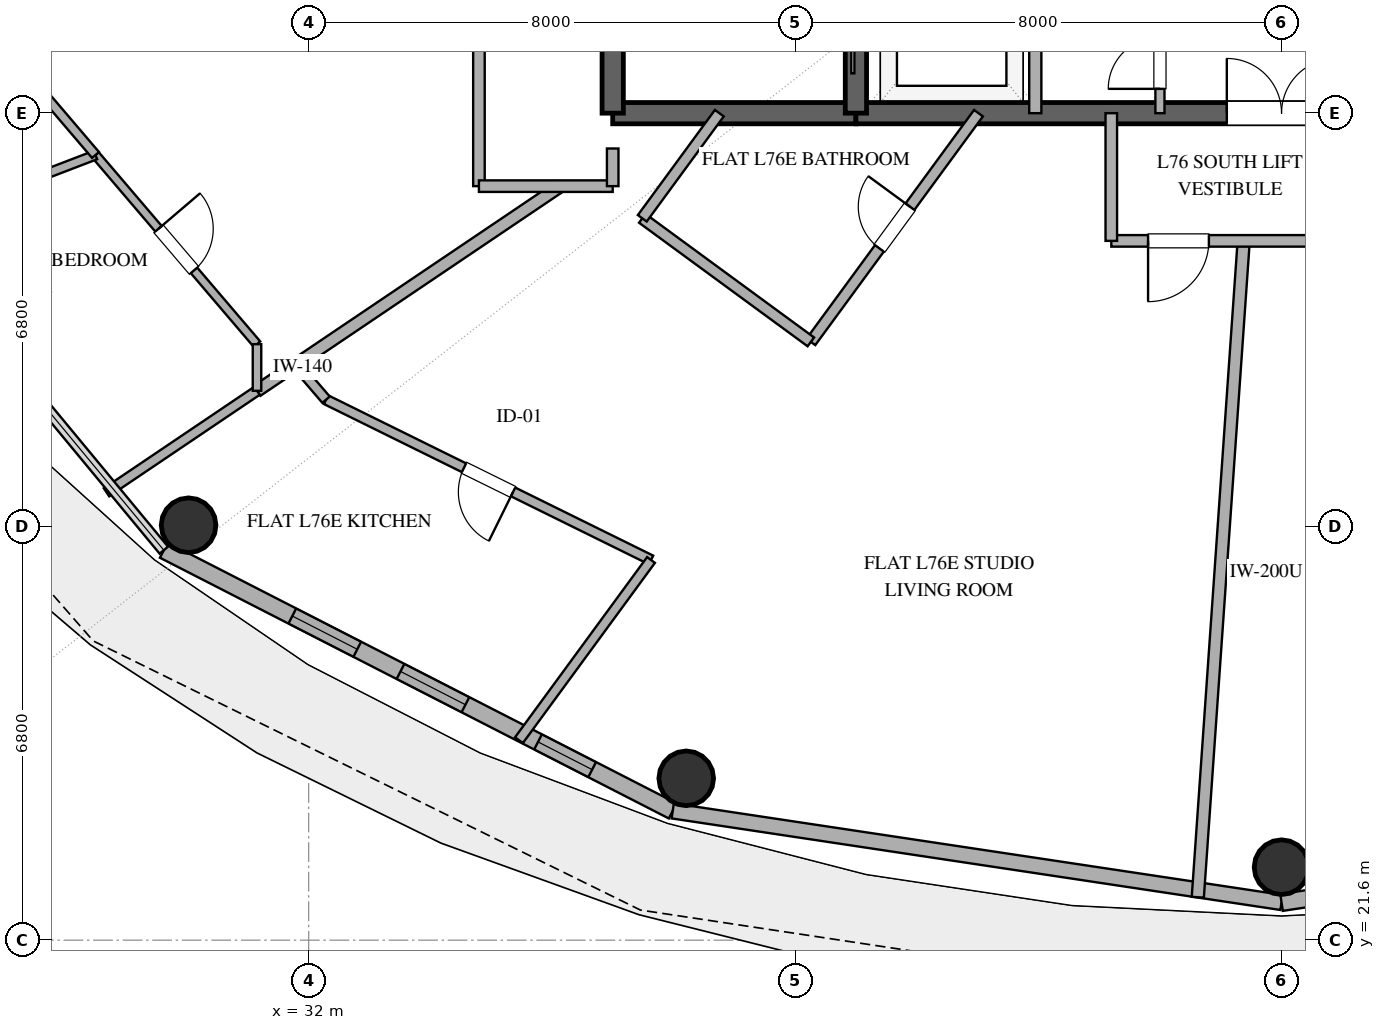
"""IFC4 building model, lengths in metres.
Left out: names, types, materials, properties, quantities, classifications, styles, units other than length and angle.
Written with IfcOpenShell. Run it as: python <this file> out.ifc"""

import sys

from ifc_helpers import new_model, si_unit, direction, frame, frame_2d, origin, origin_2d, place, context, subcontext, project, spatial, rectangle, hollow_circle, extrude, element, fill, save


model = new_model("IFC4")
c1 = context("Model", 3, precision=1e-05, world=origin(), true_north=direction((0.0, 1.0)))
c2 = subcontext(c1, "Body", "Model", "MODEL_VIEW")
j1 = project(units=[si_unit("LENGTHUNIT", "METRE"), si_unit("PLANEANGLEUNIT", "RADIAN")], contexts=[c1])
p1 = place(None, origin())
s1 = spatial("IfcSite", under=j1, at=p1, CompositionType="ELEMENT")
p2 = place(p1, origin())
s2 = spatial("IfcBuilding", under=s1, at=p2, CompositionType="ELEMENT")
p3 = place(p2, frame((0.0, 0.0, 294.6)))
s3 = spatial("IfcBuildingStorey", under=s2, at=p3, CompositionType="ELEMENT", Elevation=294.6)
p4 = place(p3, frame((37.0, 35.2, 0.0), z_axis=(0.0, 0.0, 1.0), x_axis=(1.0, 0.0, 0.0)))
e1 = element("IfcWall", 1, at=p4, inside=s3, PredefinedType="SHEAR", context=c2, shape_type="SweptSolid", body=[
    extrude(rectangle(XDim=4.0, YDim=0.35, at=frame_2d((2.0, 0.0))), origin(), (0.0, 0.0, 1.0), 3.37),
])
p5 = place(p3, frame((41.0, 35.2, 0.0), z_axis=(0.0, 0.0, 1.0), x_axis=(1.0, 0.0, 0.0)))
e2 = element("IfcWall", 2, at=p5, inside=s3, PredefinedType="SHEAR", context=c2, shape_type="SweptSolid", body=[
    extrude(rectangle(XDim=14.0, YDim=0.35, at=frame_2d((7.0, 0.0))), origin(), (0.0, 0.0, 1.0), 3.37),
])
p6 = place(p5, frame((6.1, 0.0, 0.0)))
e3 = element("IfcOpeningElement", 3, at=p6, cuts=e2, PredefinedType="OPENING", context=c2, shape_type="SweptSolid", body=[
    extrude(rectangle(XDim=1.8, YDim=2.25, at=frame_2d((0.9, 1.125))), frame((0.0, 0.185, 0.0), z_axis=(0.0, -1.0, 0.0), x_axis=(1.0, 0.0, 0.0)), (0.0, 0.0, 1.0), 0.37),
])
p7 = place(p3, frame((37.0, 35.2, 0.0), z_axis=(0.0, 0.0, 1.0), x_axis=(0.0, 1.0, 0.0)))
e4 = element("IfcWall", 4, at=p7, inside=s3, PredefinedType="SHEAR", context=c2, shape_type="SweptSolid", body=[
    extrude(rectangle(XDim=13.6, YDim=0.35, at=frame_2d((6.8, 0.0))), origin(), (0.0, 0.0, 1.0), 3.37),
])
p8 = place(p7, frame((1.5, 0.0, 0.0)))
e5 = element("IfcOpeningElement", 5, at=p8, cuts=e4, PredefinedType="OPENING", context=c2, shape_type="SweptSolid", body=[
    extrude(rectangle(XDim=1.2, YDim=2.15, at=frame_2d((0.6, 1.075))), frame((0.0, 0.185, 0.0), z_axis=(0.0, -1.0, 0.0), x_axis=(1.0, 0.0, 0.0)), (0.0, 0.0, 1.0), 0.37),
])
p9 = place(p3, frame((41.0, 35.2, 0.0), z_axis=(0.0, 0.0, 1.0), x_axis=(0.0, 1.0, 0.0)))
e6 = element("IfcWall", 6, at=p9, inside=s3, PredefinedType="SHEAR", context=c2, shape_type="SweptSolid", body=[
    extrude(rectangle(XDim=13.6, YDim=0.35, at=frame_2d((6.8, 0.0))), origin(), (0.0, 0.0, 1.0), 3.37),
])
p10 = place(p9, frame((1.15, 0.0, 0.0)))
e7 = element("IfcOpeningElement", 7, at=p10, cuts=e6, PredefinedType="OPENING", context=c2, shape_type="SweptSolid", body=[
    extrude(rectangle(XDim=1.1, YDim=2.2, at=frame_2d((0.55, 1.1))), frame((0.0, 0.185, 0.0), z_axis=(0.0, -1.0, 0.0), x_axis=(1.0, 0.0, 0.0)), (0.0, 0.0, 1.0), 0.37),
])
for number, where, z_axis, x_axis in (
    (8, (30.025, 28.424, 0.0), (0.0, 0.0, 1.0), (1.0, 0.0, 0.0)),
    (9, (38.209, 24.261, 0.0), (0.0, 0.0, 1.0), (1.0, 0.0, 0.0)),
    (10, (48.0, 22.8, 0.0), (0.0, 0.0, 1.0), (1.0, 0.0, 0.0)),
):
    element("IfcColumn", number, at=place(p3, frame(where, z_axis=z_axis, x_axis=x_axis)), inside=s3, PredefinedType="COLUMN", context=c2, shape_type="SweptSolid", body=[
        extrude(hollow_circle(Radius=0.45, WallThickness=0.025, at=origin_2d()), origin(), (0.0, 0.0, 1.0), 3.37),
    ])
p11 = place(p3, frame((29.617, 28.013, 0.0), z_axis=(0.0, 0.0, 1.0), x_axis=(0.890007394051, -0.455946091699, 0.0)))
e11 = element("IfcWall", 11, at=p11, inside=s3, PredefinedType="SOLIDWALL", context=c2, shape_type="SweptSolid", body=[
    extrude(rectangle(XDim=9.404, YDim=0.28, at=frame_2d((4.702, 0.0))), origin(), (0.0, 0.0, 1.0), 3.37),
])
p12 = place(p11, frame((2.375, 0.0, 0.85)))
e12 = element("IfcOpeningElement", 12, at=p12, cuts=e11, PredefinedType="OPENING", context=c2, shape_type="SweptSolid", body=[
    extrude(rectangle(XDim=1.2, YDim=1.6, at=frame_2d((0.6, 0.8))), frame((0.0, 0.15, 0.0), z_axis=(0.0, -1.0, 0.0), x_axis=(1.0, 0.0, 0.0)), (0.0, 0.0, 1.0), 0.3),
])
p13 = place(p11, frame((4.374, 0.0, 0.85)))
e13 = element("IfcOpeningElement", 13, at=p13, cuts=e11, PredefinedType="OPENING", context=c2, shape_type="SweptSolid", body=[
    extrude(rectangle(XDim=1.2, YDim=1.6, at=frame_2d((0.6, 0.8))), frame((0.0, 0.15, 0.0), z_axis=(0.0, -1.0, 0.0), x_axis=(1.0, 0.0, 0.0)), (0.0, 0.0, 1.0), 0.3),
])
p14 = place(p11, frame((6.915, 0.0, 0.85)))
e14 = element("IfcOpeningElement", 14, at=p14, cuts=e11, PredefinedType="OPENING", context=c2, shape_type="SweptSolid", body=[
    extrude(rectangle(XDim=1.0, YDim=1.8, at=frame_2d((0.5, 0.9))), frame((0.0, 0.15, 0.0), z_axis=(0.0, -1.0, 0.0), x_axis=(1.0, 0.0, 0.0)), (0.0, 0.0, 1.0), 0.3),
])
p15 = place(p3, frame((37.987, 23.726, 0.0), z_axis=(0.0, 0.0, 1.0), x_axis=(0.988882522213, -0.148698881169, 0.0)))
e15 = element("IfcWall", 15, at=p15, inside=s3, PredefinedType="SOLIDWALL", context=c2, shape_type="SweptSolid", body=[
    extrude(rectangle(XDim=10.125, YDim=0.25, at=frame_2d((5.062, 0.0))), origin(), (0.0, 0.0, 1.0), 3.37),
])
p16 = place(p3, frame((48.0, 22.22, 0.0), z_axis=(0.0, 0.0, 1.0), x_axis=(0.988882522213, 0.148698881169, 0.0)))
e16 = element("IfcWall", 16, at=p16, inside=s3, PredefinedType="SOLIDWALL", context=c2, shape_type="SweptSolid", body=[
    extrude(rectangle(XDim=10.125, YDim=0.28, at=frame_2d((5.062, 0.0))), origin(), (0.0, 0.0, 1.0), 3.37),
])
p17 = place(p16, frame((1.516, 0.0, 0.0)))
e17 = element("IfcOpeningElement", 17, at=p17, cuts=e16, PredefinedType="OPENING", context=c2, shape_type="SweptSolid", body=[
    extrude(rectangle(XDim=1.05, YDim=2.2, at=frame_2d((0.525, 1.1))), frame((0.0, 0.15, 0.0), z_axis=(0.0, -1.0, 0.0), x_axis=(1.0, 0.0, 0.0)), (0.0, 0.0, 1.0), 0.3),
])
p18 = place(p16, frame((6.094, 0.0, 0.85)))
e18 = element("IfcOpeningElement", 18, at=p18, cuts=e16, PredefinedType="OPENING", context=c2, shape_type="SweptSolid", body=[
    extrude(rectangle(XDim=1.65, YDim=2.0, at=frame_2d((0.825, 1.0))), frame((0.0, 0.15, 0.0), z_axis=(0.0, -1.0, 0.0), x_axis=(1.0, 0.0, 0.0)), (0.0, 0.0, 1.0), 0.3),
])
p19 = place(p3, frame((43.95, 35.2, 0.0), z_axis=(0.0, 0.0, 1.0), x_axis=(0.0, 1.0, 0.0)))
e19 = element("IfcWall", 19, at=p19, inside=s3, PredefinedType="SOLIDWALL", context=c2, shape_type="SweptSolid", body=[
    extrude(rectangle(XDim=3.2, YDim=0.2, at=frame_2d((1.6, 0.0))), origin(), (0.0, 0.0, 1.0), 2.73),
])
p20 = place(p3, frame((46.0, 35.2, 0.0), z_axis=(0.0, 0.0, 1.0), x_axis=(0.0, 1.0, 0.0)))
e20 = element("IfcWall", 20, at=p20, inside=s3, PredefinedType="PARTITIONING", context=c2, shape_type="SweptSolid", body=[
    extrude(rectangle(XDim=3.2, YDim=0.15, at=frame_2d((1.6, 0.0))), origin(), (0.0, 0.0, 1.0), 2.73),
])
p21 = place(p20, frame((0.4, 0.0, 0.0)))
e21 = element("IfcOpeningElement", 21, at=p21, cuts=e20, PredefinedType="OPENING", context=c2, shape_type="SweptSolid", body=[
    extrude(rectangle(XDim=0.85, YDim=2.15, at=frame_2d((0.425, 1.075))), frame((0.0, 0.085, 0.0), z_axis=(0.0, -1.0, 0.0), x_axis=(1.0, 0.0, 0.0)), (0.0, 0.0, 1.0), 0.17),
])
p22 = place(p20, frame((1.85, 0.0, 0.0)))
e22 = element("IfcOpeningElement", 22, at=p22, cuts=e20, PredefinedType="OPENING", context=c2, shape_type="SweptSolid", body=[
    extrude(rectangle(XDim=0.85, YDim=2.15, at=frame_2d((0.425, 1.075))), frame((0.0, 0.085, 0.0), z_axis=(0.0, -1.0, 0.0), x_axis=(1.0, 0.0, 0.0)), (0.0, 0.0, 1.0), 0.17),
])
p23 = place(p3, frame((47.378, 33.1, 0.0), z_axis=(0.0, 0.0, 1.0), x_axis=(-0.069765360577, -0.997563428792, 0.0)))
e23 = element("IfcWall", 23, at=p23, inside=s3, PredefinedType="PARTITIONING", context=c2, shape_type="SweptSolid", body=[
    extrude(rectangle(XDim=10.82, YDim=0.2, at=frame_2d((5.41, 0.0))), origin(), (0.0, 0.0, 1.0), 2.73),
])
p24 = place(p3, frame((34.8, 34.0, 0.0), z_axis=(0.0, 0.0, 1.0), x_axis=(0.0, 1.0, 0.0)))
e24 = element("IfcWall", 24, at=p24, inside=s3, PredefinedType="PARTITIONING", context=c2, shape_type="SweptSolid", body=[
    extrude(rectangle(XDim=12.323, YDim=0.19, at=frame_2d((6.161, 0.0))), origin(), (0.0, 0.0, 1.0), 2.73),
])
p25 = place(p24, frame((4.849, 0.0, 0.0)))
e25 = element("IfcOpeningElement", 25, at=p25, cuts=e24, PredefinedType="OPENING", context=c2, shape_type="SweptSolid", body=[
    extrude(rectangle(XDim=1.0, YDim=2.2, at=frame_2d((0.5, 1.1))), frame((0.0, 0.105, 0.0), z_axis=(0.0, -1.0, 0.0), x_axis=(1.0, 0.0, 0.0)), (0.0, 0.0, 1.0), 0.21),
])
p26 = place(p3, frame((37.63, 27.852, 0.0), z_axis=(0.0, 0.0, 1.0), x_axis=(-0.896847493932, 0.442339883605, 0.0)))
e26 = element("IfcWall", 26, at=p26, inside=s3, PredefinedType="PLUMBINGWALL", context=c2, shape_type="SweptSolid", body=[
    extrude(rectangle(XDim=5.959, YDim=0.16, at=frame_2d((2.979, 0.0))), origin(), (0.0, 0.0, 1.0), 2.73),
])
p27 = place(p26, frame((2.53, 0.0, 0.0)))
e27 = element("IfcOpeningElement", 27, at=p27, cuts=e26, PredefinedType="OPENING", context=c2, shape_type="SweptSolid", body=[
    extrude(rectangle(XDim=0.9, YDim=2.1, at=frame_2d((0.45, 1.05))), frame((0.0, 0.09, 0.0), z_axis=(0.0, -1.0, 0.0), x_axis=(1.0, 0.0, 0.0)), (0.0, 0.0, 1.0), 0.18),
])
p28 = place(p3, frame((31.15, 30.635, 0.0), z_axis=(0.0, 0.0, 1.0), x_axis=(0.829036266652, 0.559194839546, 0.0)))
e28 = element("IfcWall", 28, at=p28, inside=s3, PredefinedType="PARTITIONING", context=c2, shape_type="SweptSolid", body=[
    extrude(rectangle(XDim=6.019, YDim=0.2, at=frame_2d((3.009, 0.0))), origin(), (0.0, 0.0, 1.0), 2.73),
])
p29 = place(p3, frame((40.259, 31.439, 0.0), z_axis=(0.0, 0.0, 1.0), x_axis=(0.591168457908, 0.806548110391, 0.0)))
e29 = element("IfcWall", 29, at=p29, inside=s3, PredefinedType="PLUMBINGWALL", context=c2, shape_type="SweptSolid", body=[
    extrude(rectangle(XDim=4.663, YDim=0.18, at=frame_2d((2.332, 0.0))), origin(), (0.0, 0.0, 1.0), 2.73),
])
p30 = place(p29, frame((1.907, 0.0, 0.0)))
e30 = element("IfcOpeningElement", 30, at=p30, cuts=e29, PredefinedType="OPENING", context=c2, shape_type="SweptSolid", body=[
    extrude(rectangle(XDim=0.85, YDim=2.1, at=frame_2d((0.425, 1.05))), frame((0.0, 0.1, 0.0), z_axis=(0.0, -1.0, 0.0), x_axis=(1.0, 0.0, 0.0)), (0.0, 0.0, 1.0), 0.2),
])
p31 = place(p3, frame((28.494, 34.512, 0.0), z_axis=(0.0, 0.0, 1.0), x_axis=(0.649192484668, -0.760624163336, 0.0)))
e31 = element("IfcWall", 31, at=p31, inside=s3, PredefinedType="PARTITIONING", context=c2, shape_type="SweptSolid", body=[
    extrude(rectangle(XDim=4.091, YDim=0.14, at=frame_2d((2.045, 0.0))), origin(), (0.0, 0.0, 1.0), 2.73),
])
p32 = place(p31, frame((1.595, 0.0, 0.0)))
e32 = element("IfcOpeningElement", 32, at=p32, cuts=e31, PredefinedType="OPENING", context=c2, shape_type="SweptSolid", body=[
    extrude(rectangle(XDim=0.9, YDim=2.1, at=frame_2d((0.45, 1.05))), frame((0.0, 0.08, 0.0), z_axis=(0.0, -1.0, 0.0), x_axis=(1.0, 0.0, 0.0)), (0.0, 0.0, 1.0), 0.16),
])
p33 = place(p3, frame((35.458, 24.888, 0.0), z_axis=(0.0, 0.0, 1.0), x_axis=(0.591118806012, 0.806584500954, 0.0)))
e33 = element("IfcWall", 33, at=p33, inside=s3, PredefinedType="PLUMBINGWALL", context=c2, shape_type="SweptSolid", body=[
    extrude(rectangle(XDim=3.675, YDim=0.16, at=frame_2d((1.837, 0.0))), origin(), (0.0, 0.0, 1.0), 2.73),
])
p34 = place(p3, frame((28.494, 34.512, 0.0), z_axis=(0.0, 0.0, 1.0), x_axis=(-0.933587977353, -0.358348278274, 0.0)))
e34 = element("IfcWall", 34, at=p34, inside=s3, PredefinedType="PARTITIONING", context=c2, shape_type="SweptSolid", body=[
    extrude(rectangle(XDim=3.58, YDim=0.15, at=frame_2d((1.79, 0.0))), origin(), (0.0, 0.0, 1.0), 2.73),
])
p35 = place(p3, frame((50.8, 33.1, 0.0), z_axis=(0.0, 0.0, 1.0), x_axis=(-1.0, 0.0, 0.0)))
e35 = element("IfcWall", 35, at=p35, inside=s3, PredefinedType="PARTITIONING", context=c2, shape_type="SweptSolid", body=[
    extrude(rectangle(XDim=5.6, YDim=0.19, at=frame_2d((2.8, 0.0))), origin(), (0.0, 0.0, 1.0), 2.73),
])
p36 = place(p35, frame((1.227, 0.0, 0.0)))
e36 = element("IfcOpeningElement", 36, at=p36, cuts=e35, PredefinedType="OPENING", context=c2, shape_type="SweptSolid", body=[
    extrude(rectangle(XDim=1.0, YDim=2.2, at=frame_2d((0.5, 1.1))), frame((0.0, 0.105, 0.0), z_axis=(0.0, -1.0, 0.0), x_axis=(1.0, 0.0, 0.0)), (0.0, 0.0, 1.0), 0.21),
])
p37 = place(p35, frame((3.995, 0.0, 0.0)))
e37 = element("IfcOpeningElement", 37, at=p37, cuts=e35, PredefinedType="OPENING", context=c2, shape_type="SweptSolid", body=[
    extrude(rectangle(XDim=1.0, YDim=2.2, at=frame_2d((0.5, 1.1))), frame((0.0, 0.105, 0.0), z_axis=(0.0, -1.0, 0.0), x_axis=(1.0, 0.0, 0.0)), (0.0, 0.0, 1.0), 0.21),
])
p38 = place(p3, frame((37.486, 33.471, 0.0), z_axis=(0.0, 0.0, 1.0), x_axis=(0.80655624282, -0.59115736244, 0.0)))
e38 = element("IfcWall", 38, at=p38, inside=s3, PredefinedType="PLUMBINGWALL", context=c2, shape_type="SweptSolid", body=[
    extrude(rectangle(XDim=3.438, YDim=0.18, at=frame_2d((1.719, 0.0))), origin(), (0.0, 0.0, 1.0), 2.73),
])
p39 = place(p3, frame((31.15, 30.635, 0.0), z_axis=(0.0, 0.0, 1.0), x_axis=(-0.82904391661, -0.559183497907, 0.0)))
e39 = element("IfcWall", 39, at=p39, inside=s3, PredefinedType="PLUMBINGWALL", context=c2, shape_type="SweptSolid", body=[
    extrude(rectangle(XDim=2.986, YDim=0.16, at=frame_2d((1.493, 0.0))), origin(), (0.0, 0.0, 1.0), 2.73),
])
p40 = place(p3, frame((38.754, 35.2, 0.0), z_axis=(0.0, 0.0, 1.0), x_axis=(-0.591255046212, -0.806484637379, 0.0)))
e40 = element("IfcWall", 40, at=p40, inside=s3, PredefinedType="PLUMBINGWALL", context=c2, shape_type="SweptSolid", body=[
    extrude(rectangle(XDim=2.144, YDim=0.18, at=frame_2d((1.072, 0.0))), origin(), (0.0, 0.0, 1.0), 2.73),
])
p41 = place(p3, frame((45.2, 33.1, 0.0), z_axis=(0.0, 0.0, 1.0), x_axis=(0.0, 1.0, 0.0)))
e41 = element("IfcWall", 41, at=p41, inside=s3, PredefinedType="PARTITIONING", context=c2, shape_type="SweptSolid", body=[
    extrude(rectangle(XDim=2.1, YDim=0.19, at=frame_2d((1.05, 0.0))), origin(), (0.0, 0.0, 1.0), 2.73),
])
p42 = place(p3, frame((27.519, 35.655, 0.0), z_axis=(0.0, 0.0, 1.0), x_axis=(0.649250915383, -0.760574288859, 0.0)))
e42 = element("IfcWall", 42, at=p42, inside=s3, PredefinedType="PARTITIONING", context=c2, shape_type="SweptSolid", body=[
    extrude(rectangle(XDim=1.502, YDim=0.15, at=frame_2d((0.751, 0.0))), origin(), (0.0, 0.0, 1.0), 2.73),
])
p43 = place(p3, frame((37.0, 34.0, 0.0), z_axis=(0.0, 0.0, 1.0), x_axis=(-1.0, 0.0, 0.0)))
e43 = element("IfcWall", 43, at=p43, inside=s3, PredefinedType="PARTITIONING", context=c2, shape_type="SweptSolid", body=[
    extrude(rectangle(XDim=2.2, YDim=0.19, at=frame_2d((1.1, 0.0))), origin(), (0.0, 0.0, 1.0), 2.73),
])
p44 = place(p3, frame((31.15, 31.401, 0.0), z_axis=(0.0, 0.0, 1.0), x_axis=(0.0, -1.0, 0.0)))
e44 = element("IfcWall", 44, at=p44, inside=s3, PredefinedType="PARTITIONING", context=c2, shape_type="SweptSolid", body=[
    extrude(rectangle(XDim=0.767, YDim=0.14, at=frame_2d((0.383, 0.0))), origin(), (0.0, 0.0, 1.0), 2.73),
])
p45 = place(p3, frame((32.286, 30.488, 0.0), z_axis=(0.0, 0.0, 1.0), x_axis=(-0.651714881855, 0.758464048435, 0.0)))
e45 = element("IfcWall", 45, at=p45, inside=s3, PredefinedType="PLUMBINGWALL", context=c2, shape_type="SweptSolid", body=[
    extrude(rectangle(XDim=0.761, YDim=0.16, at=frame_2d((0.381, 0.0))), origin(), (0.0, 0.0, 1.0), 2.73),
])
p46 = place(p3, frame((37.0, 34.619, 0.0), z_axis=(0.0, 0.0, 1.0), x_axis=(0.0, -1.0, 0.0)))
e46 = element("IfcWall", 46, at=p46, inside=s3, PredefinedType="PARTITIONING", context=c2, shape_type="SweptSolid", body=[
    extrude(rectangle(XDim=0.619, YDim=0.19, at=frame_2d((0.31, 0.0))), origin(), (0.0, 0.0, 1.0), 2.73),
])
p47 = place(p12, origin())
e47 = element("IfcWindow", 47, at=p47, inside=s3, PartitioningType="SINGLE_PANEL", PredefinedType="WINDOW", context=c2, shape_type="SweptSolid", body=[
    extrude(rectangle(XDim=1.2, YDim=1.6, at=frame_2d((0.6, 0.8))), frame((0.0, 0.03, 0.0), z_axis=(0.0, -1.0, 0.0), x_axis=(1.0, 0.0, 0.0)), (0.0, 0.0, 1.0), 0.06),
])
fill(e12, e47)
p48 = place(p13, origin())
e48 = element("IfcWindow", 48, at=p48, inside=s3, PartitioningType="SINGLE_PANEL", PredefinedType="WINDOW", context=c2, shape_type="SweptSolid", body=[
    extrude(rectangle(XDim=1.2, YDim=1.6, at=frame_2d((0.6, 0.8))), frame((0.0, 0.03, 0.0), z_axis=(0.0, -1.0, 0.0), x_axis=(1.0, 0.0, 0.0)), (0.0, 0.0, 1.0), 0.06),
])
fill(e13, e48)
p49 = place(p14, origin())
e49 = element("IfcWindow", 49, at=p49, inside=s3, PartitioningType="SINGLE_PANEL", PredefinedType="WINDOW", context=c2, shape_type="SweptSolid", body=[
    extrude(rectangle(XDim=1.0, YDim=1.8, at=frame_2d((0.5, 0.9))), frame((0.0, 0.03, 0.0), z_axis=(0.0, -1.0, 0.0), x_axis=(1.0, 0.0, 0.0)), (0.0, 0.0, 1.0), 0.06),
])
fill(e14, e49)
p50 = place(p6, origin())
e50 = element("IfcDoor", 50, at=p50, inside=s3, OperationType="DOUBLE_DOOR_SINGLE_SWING", PredefinedType="DOOR", context=c2, shape_type="SweptSolid", body=[
    extrude(rectangle(XDim=1.8, YDim=2.25, at=frame_2d((0.9, 1.125))), frame((0.0, 0.025, 0.0), z_axis=(0.0, -1.0, 0.0), x_axis=(1.0, 0.0, 0.0)), (0.0, 0.0, 1.0), 0.05),
])
fill(e3, e50)
p51 = place(p21, origin())
e51 = element("IfcDoor", 51, at=p51, inside=s3, OperationType="SINGLE_SWING_LEFT", PredefinedType="DOOR", context=c2, shape_type="SweptSolid", body=[
    extrude(rectangle(XDim=0.85, YDim=2.15, at=frame_2d((0.425, 1.075))), frame((0.0, 0.025, 0.0), z_axis=(0.0, -1.0, 0.0), x_axis=(1.0, 0.0, 0.0)), (0.0, 0.0, 1.0), 0.05),
])
fill(e21, e51)
p52 = place(p27, origin())
e52 = element("IfcDoor", 52, at=p52, inside=s3, OperationType="SINGLE_SWING_LEFT", PredefinedType="DOOR", context=c2, shape_type="SweptSolid", body=[
    extrude(rectangle(XDim=0.9, YDim=2.1, at=frame_2d((0.45, 1.05))), frame((0.0, 0.025, 0.0), z_axis=(0.0, -1.0, 0.0), x_axis=(1.0, 0.0, 0.0)), (0.0, 0.0, 1.0), 0.05),
])
fill(e27, e52)
p53 = place(p30, origin())
e53 = element("IfcDoor", 53, at=p53, inside=s3, OperationType="SINGLE_SWING_RIGHT", PredefinedType="DOOR", context=c2, shape_type="SweptSolid", body=[
    extrude(rectangle(XDim=0.85, YDim=2.1, at=frame_2d((0.425, 1.05))), frame((0.0, 0.025, 0.0), z_axis=(0.0, -1.0, 0.0), x_axis=(1.0, 0.0, 0.0)), (0.0, 0.0, 1.0), 0.05),
])
fill(e30, e53)
p54 = place(p32, origin())
e54 = element("IfcDoor", 54, at=p54, inside=s3, OperationType="SINGLE_SWING_LEFT", PredefinedType="DOOR", context=c2, shape_type="SweptSolid", body=[
    extrude(rectangle(XDim=0.9, YDim=2.1, at=frame_2d((0.45, 1.05))), frame((0.0, 0.025, 0.0), z_axis=(0.0, -1.0, 0.0), x_axis=(1.0, 0.0, 0.0)), (0.0, 0.0, 1.0), 0.05),
])
fill(e32, e54)
p55 = place(p37, origin())
e55 = element("IfcDoor", 55, at=p55, inside=s3, OperationType="SINGLE_SWING_RIGHT", PredefinedType="DOOR", context=c2, shape_type="SweptSolid", body=[
    extrude(rectangle(XDim=1.0, YDim=2.2, at=frame_2d((0.5, 1.1))), frame((0.0, 0.025, 0.0), z_axis=(0.0, -1.0, 0.0), x_axis=(1.0, 0.0, 0.0)), (0.0, 0.0, 1.0), 0.05),
])
fill(e37, e55)
save(model, sys.argv[1])
